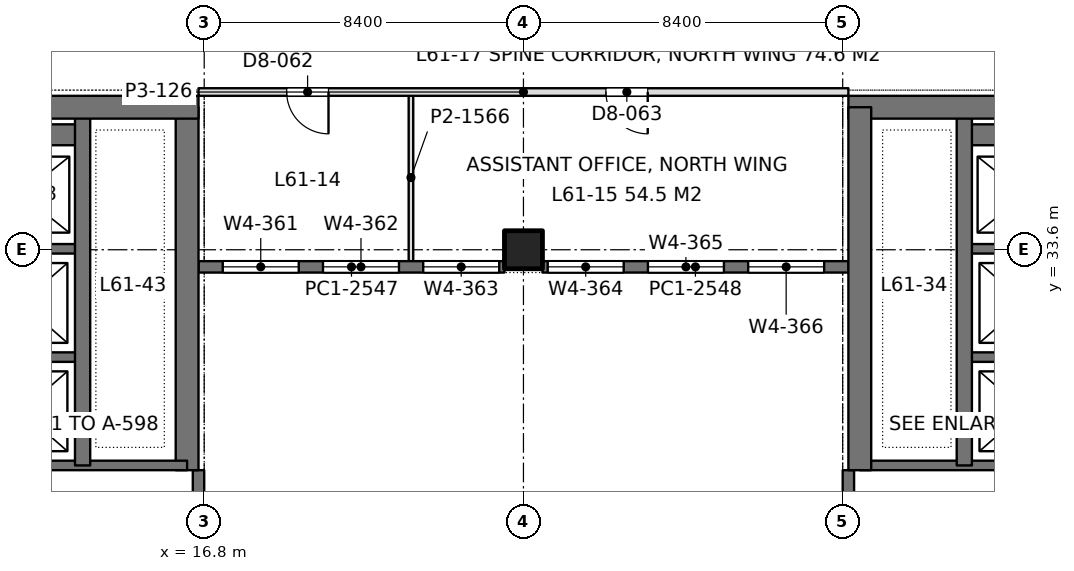
"""IFC4 building model, lengths in metres.
Left out: names, types, materials, properties, quantities, classifications, styles, units other than length and angle.
Written with IfcOpenShell. Run it as: python <this file> out.ifc"""

import sys

from ifc_helpers import new_model, si_unit, direction, frame, frame_2d, origin, origin_2d, place, context, subcontext, project, spatial, rectangle, extrude, element, fill, save


model = new_model("IFC4")
c1 = context("Model", 3, precision=1e-05, world=origin(), true_north=direction((0.0, 1.0)))
c2 = subcontext(c1, "Body", "Model", "MODEL_VIEW")
j1 = project(units=[si_unit("LENGTHUNIT", "METRE"), si_unit("PLANEANGLEUNIT", "RADIAN")], contexts=[c1])
p1 = place(None, origin())
s1 = spatial("IfcSite", under=j1, at=p1, CompositionType="ELEMENT")
p2 = place(p1, origin())
s2 = spatial("IfcBuilding", under=s1, at=p2, CompositionType="ELEMENT")
p3 = place(p2, frame((0.0, 0.0, 268.2)))
s3 = spatial("IfcBuildingStorey", under=s2, at=p3, CompositionType="ELEMENT", Elevation=268.2)
p4 = place(p3, frame((25.2, 33.6, 0.0), z_axis=(0.0, 0.0, 1.0), x_axis=(1.0, 0.0, 0.0)))
e1 = element("IfcColumn", 1, at=p4, inside=s3, PredefinedType="COLUMN", context=c2, shape_type="SweptSolid", body=[
    extrude(rectangle(XDim=1.0, YDim=1.0, at=origin_2d()), origin(), (0.0, 0.0, 1.0), 4.5),
])
p5 = place(p3, frame((-1.05, 37.35, 0.0), z_axis=(0.0, 0.0, 1.0), x_axis=(1.0, 0.0, 0.0)))
e2 = element("IfcWall", 2, at=p5, inside=s3, PredefinedType="SHEAR", context=c2, shape_type="SweptSolid", body=[
    extrude(rectangle(XDim=17.7, YDim=0.6, at=frame_2d((8.85, 0.0))), origin(), (0.0, 0.0, 1.0), 4.5),
])
p6 = place(p5, frame((8.8, 0.0, 0.0)))
e3 = element("IfcOpeningElement", 3, at=p6, cuts=e2, PredefinedType="OPENING", context=c2, shape_type="SweptSolid", body=[
    extrude(rectangle(XDim=1.8, YDim=2.4, at=frame_2d((0.9, 1.2))), frame((0.0, 0.31, 0.0), z_axis=(0.0, -1.0, 0.0), x_axis=(1.0, 0.0, 0.0)), (0.0, 0.0, 1.0), 0.62),
])
p7 = place(p3, frame((16.35, 27.8, 0.0), z_axis=(0.0, 0.0, 1.0), x_axis=(0.0, 1.0, 0.0)))
e4 = element("IfcWall", 4, at=p7, inside=s3, PredefinedType="SHEAR", context=c2, shape_type="SweptSolid", body=[
    extrude(rectangle(XDim=9.55, YDim=0.6, at=frame_2d((4.775, 0.0))), origin(), (0.0, 0.0, 1.0), 4.5),
])
p8 = place(p3, frame((13.6, 27.925, 0.0), z_axis=(0.0, 0.0, 1.0), x_axis=(0.0, 1.0, 0.0)))
e5 = element("IfcWall", 5, at=p8, inside=s3, PredefinedType="SHEAR", context=c2, shape_type="SweptSolid", body=[
    extrude(rectangle(XDim=9.425, YDim=0.4, at=frame_2d((4.712, 0.0))), origin(), (0.0, 0.0, 1.0), 4.5),
])
p9 = place(p3, frame((10.4, 27.925, 0.0), z_axis=(0.0, 0.0, 1.0), x_axis=(1.0, 0.0, 0.0)))
e6 = element("IfcWall", 6, at=p9, inside=s3, PredefinedType="SHEAR", context=c2, shape_type="SweptSolid", body=[
    extrude(rectangle(XDim=5.95, YDim=0.25, at=frame_2d((2.975, 0.0))), origin(), (0.0, 0.0, 1.0), 4.5),
])
for number, where, z_axis, x_axis in (
    (7, (10.4, 30.775, 0.0), (0.0, 0.0, 1.0), (1.0, 0.0, 0.0)),
    (8, (10.4, 33.625, 0.0), (0.0, 0.0, 1.0), (1.0, 0.0, 0.0)),
):
    element("IfcWall", number, at=place(p3, frame(where, z_axis=z_axis, x_axis=x_axis)), inside=s3, PredefinedType="SHEAR", context=c2, shape_type="SweptSolid", body=[
        extrude(rectangle(XDim=3.2, YDim=0.25, at=frame_2d((1.6, 0.0))), origin(), (0.0, 0.0, 1.0), 4.5),
    ])
p10 = place(p3, frame((10.4, 36.625, 0.0), z_axis=(0.0, 0.0, 1.0), x_axis=(1.0, 0.0, 0.0)))
e9 = element("IfcWall", 9, at=p10, inside=s3, PredefinedType="SHEAR", context=c2, shape_type="SweptSolid", body=[
    extrude(rectangle(XDim=3.2, YDim=0.55, at=frame_2d((1.6, 0.0))), origin(), (0.0, 0.0, 1.0), 4.5),
])
p11 = place(p3, frame((33.75, 37.35, 0.0), z_axis=(0.0, 0.0, 1.0), x_axis=(1.0, 0.0, 0.0)))
e10 = element("IfcWall", 10, at=p11, inside=s3, PredefinedType="SHEAR", context=c2, shape_type="SweptSolid", body=[
    extrude(rectangle(XDim=17.7, YDim=0.6, at=frame_2d((8.85, 0.0))), origin(), (0.0, 0.0, 1.0), 4.5),
])
p12 = place(p11, frame((7.1, 0.0, 0.0)))
e11 = element("IfcOpeningElement", 11, at=p12, cuts=e10, PredefinedType="OPENING", context=c2, shape_type="SweptSolid", body=[
    extrude(rectangle(XDim=1.8, YDim=2.4, at=frame_2d((0.9, 1.2))), frame((0.0, 0.31, 0.0), z_axis=(0.0, -1.0, 0.0), x_axis=(1.0, 0.0, 0.0)), (0.0, 0.0, 1.0), 0.62),
])
p13 = place(p3, frame((34.05, 27.8, 0.0), z_axis=(0.0, 0.0, 1.0), x_axis=(0.0, 1.0, 0.0)))
e12 = element("IfcWall", 12, at=p13, inside=s3, PredefinedType="SHEAR", context=c2, shape_type="SweptSolid", body=[
    extrude(rectangle(XDim=9.55, YDim=0.6, at=frame_2d((4.775, 0.0))), origin(), (0.0, 0.0, 1.0), 4.5),
])
p14 = place(p3, frame((36.8, 27.925, 0.0), z_axis=(0.0, 0.0, 1.0), x_axis=(0.0, 1.0, 0.0)))
e13 = element("IfcWall", 13, at=p14, inside=s3, PredefinedType="SHEAR", context=c2, shape_type="SweptSolid", body=[
    extrude(rectangle(XDim=9.425, YDim=0.4, at=frame_2d((4.712, 0.0))), origin(), (0.0, 0.0, 1.0), 4.5),
])
p15 = place(p3, frame((40.0, 27.925, 0.0), z_axis=(0.0, 0.0, 1.0), x_axis=(-1.0, 0.0, 0.0)))
e14 = element("IfcWall", 14, at=p15, inside=s3, PredefinedType="SHEAR", context=c2, shape_type="SweptSolid", body=[
    extrude(rectangle(XDim=5.95, YDim=0.25, at=frame_2d((2.975, 0.0))), origin(), (0.0, 0.0, 1.0), 4.5),
])
for number, where, z_axis, x_axis in (
    (15, (40.0, 30.775, 0.0), (0.0, 0.0, 1.0), (-1.0, 0.0, 0.0)),
    (16, (40.0, 33.625, 0.0), (0.0, 0.0, 1.0), (-1.0, 0.0, 0.0)),
):
    element("IfcWall", number, at=place(p3, frame(where, z_axis=z_axis, x_axis=x_axis)), inside=s3, PredefinedType="SHEAR", context=c2, shape_type="SweptSolid", body=[
        extrude(rectangle(XDim=3.2, YDim=0.25, at=frame_2d((1.6, 0.0))), origin(), (0.0, 0.0, 1.0), 4.5),
    ])
p16 = place(p3, frame((40.0, 36.625, 0.0), z_axis=(0.0, 0.0, 1.0), x_axis=(-1.0, 0.0, 0.0)))
e17 = element("IfcWall", 17, at=p16, inside=s3, PredefinedType="SHEAR", context=c2, shape_type="SweptSolid", body=[
    extrude(rectangle(XDim=3.2, YDim=0.55, at=frame_2d((1.6, 0.0))), origin(), (0.0, 0.0, 1.0), 4.5),
])
p17 = place(p3, frame((16.65, 17.1, 0.0), z_axis=(0.0, 0.0, 1.0), x_axis=(0.0, 1.0, 0.0)))
e18 = element("IfcWall", 18, at=p17, inside=s3, PredefinedType="SOLIDWALL", context=c2, shape_type="SweptSolid", body=[
    extrude(rectangle(XDim=10.7, YDim=0.3, at=frame_2d((5.35, 0.0))), origin(), (0.0, 0.0, 1.0), 4.35),
])
p18 = place(p17, frame((0.55, 0.0, 0.9)))
e19 = element("IfcOpeningElement", 19, at=p18, cuts=e18, PredefinedType="OPENING", context=c2, shape_type="SweptSolid", body=[
    extrude(rectangle(XDim=2.0, YDim=1.9, at=frame_2d((1.0, 0.95))), frame((0.0, 0.16, 0.0), z_axis=(0.0, -1.0, 0.0), x_axis=(1.0, 0.0, 0.0)), (0.0, 0.0, 1.0), 0.32),
])
p19 = place(p17, frame((2.9, 0.0, 0.9)))
e20 = element("IfcOpeningElement", 20, at=p19, cuts=e18, PredefinedType="OPENING", context=c2, shape_type="SweptSolid", body=[
    extrude(rectangle(XDim=2.0, YDim=1.9, at=frame_2d((1.0, 0.95))), frame((0.0, 0.16, 0.0), z_axis=(0.0, -1.0, 0.0), x_axis=(1.0, 0.0, 0.0)), (0.0, 0.0, 1.0), 0.32),
])
p20 = place(p17, frame((7.675, 0.0, 0.9)))
e21 = element("IfcOpeningElement", 21, at=p20, cuts=e18, PredefinedType="OPENING", context=c2, shape_type="SweptSolid", body=[
    extrude(rectangle(XDim=2.0, YDim=1.9, at=frame_2d((1.0, 0.95))), frame((0.0, 0.16, 0.0), z_axis=(0.0, -1.0, 0.0), x_axis=(1.0, 0.0, 0.0)), (0.0, 0.0, 1.0), 0.32),
])
p21 = place(p3, frame((33.75, 17.1, 0.0), z_axis=(0.0, 0.0, 1.0), x_axis=(0.0, 1.0, 0.0)))
e22 = element("IfcWall", 22, at=p21, inside=s3, PredefinedType="SOLIDWALL", context=c2, shape_type="SweptSolid", body=[
    extrude(rectangle(XDim=10.7, YDim=0.3, at=frame_2d((5.35, 0.0))), origin(), (0.0, 0.0, 1.0), 4.35),
])
p22 = place(p21, frame((0.55, 0.0, 0.9)))
e23 = element("IfcOpeningElement", 23, at=p22, cuts=e22, PredefinedType="OPENING", context=c2, shape_type="SweptSolid", body=[
    extrude(rectangle(XDim=2.0, YDim=1.9, at=frame_2d((1.0, 0.95))), frame((0.0, 0.16, 0.0), z_axis=(0.0, -1.0, 0.0), x_axis=(1.0, 0.0, 0.0)), (0.0, 0.0, 1.0), 0.32),
])
p23 = place(p21, frame((2.9, 0.0, 0.9)))
e24 = element("IfcOpeningElement", 24, at=p23, cuts=e22, PredefinedType="OPENING", context=c2, shape_type="SweptSolid", body=[
    extrude(rectangle(XDim=2.0, YDim=1.9, at=frame_2d((1.0, 0.95))), frame((0.0, 0.16, 0.0), z_axis=(0.0, -1.0, 0.0), x_axis=(1.0, 0.0, 0.0)), (0.0, 0.0, 1.0), 0.32),
])
p24 = place(p21, frame((7.675, 0.0, 0.9)))
e25 = element("IfcOpeningElement", 25, at=p24, cuts=e22, PredefinedType="OPENING", context=c2, shape_type="SweptSolid", body=[
    extrude(rectangle(XDim=2.0, YDim=1.9, at=frame_2d((1.0, 0.95))), frame((0.0, 0.16, 0.0), z_axis=(0.0, -1.0, 0.0), x_axis=(1.0, 0.0, 0.0)), (0.0, 0.0, 1.0), 0.32),
])
p25 = place(p3, frame((16.65, 33.15, 0.0), z_axis=(0.0, 0.0, 1.0), x_axis=(1.0, 0.0, 0.0)))
e26 = element("IfcWall", 26, at=p25, inside=s3, PredefinedType="SOLIDWALL", context=c2, shape_type="SweptSolid", body=[
    extrude(rectangle(XDim=8.05, YDim=0.3, at=frame_2d((4.025, 0.0))), origin(), (0.0, 0.0, 1.0), 4.35),
])
p26 = place(p25, frame((0.637, 0.0, 0.9)))
e27 = element("IfcOpeningElement", 27, at=p26, cuts=e26, PredefinedType="OPENING", context=c2, shape_type="SweptSolid", body=[
    extrude(rectangle(XDim=2.0, YDim=1.9, at=frame_2d((1.0, 0.95))), frame((0.0, 0.16, 0.0), z_axis=(0.0, -1.0, 0.0), x_axis=(1.0, 0.0, 0.0)), (0.0, 0.0, 1.0), 0.32),
])
p27 = place(p25, frame((3.275, 0.0, 0.9)))
e28 = element("IfcOpeningElement", 28, at=p27, cuts=e26, PredefinedType="OPENING", context=c2, shape_type="SweptSolid", body=[
    extrude(rectangle(XDim=2.0, YDim=1.9, at=frame_2d((1.0, 0.95))), frame((0.0, 0.16, 0.0), z_axis=(0.0, -1.0, 0.0), x_axis=(1.0, 0.0, 0.0)), (0.0, 0.0, 1.0), 0.32),
])
p28 = place(p25, frame((5.913, 0.0, 0.9)))
e29 = element("IfcOpeningElement", 29, at=p28, cuts=e26, PredefinedType="OPENING", context=c2, shape_type="SweptSolid", body=[
    extrude(rectangle(XDim=2.0, YDim=1.9, at=frame_2d((1.0, 0.95))), frame((0.0, 0.16, 0.0), z_axis=(0.0, -1.0, 0.0), x_axis=(1.0, 0.0, 0.0)), (0.0, 0.0, 1.0), 0.32),
])
p29 = place(p3, frame((25.7, 33.15, 0.0), z_axis=(0.0, 0.0, 1.0), x_axis=(1.0, 0.0, 0.0)))
e30 = element("IfcWall", 30, at=p29, inside=s3, PredefinedType="SOLIDWALL", context=c2, shape_type="SweptSolid", body=[
    extrude(rectangle(XDim=8.05, YDim=0.3, at=frame_2d((4.025, 0.0))), origin(), (0.0, 0.0, 1.0), 4.35),
])
p30 = place(p29, frame((0.137, 0.0, 0.9)))
e31 = element("IfcOpeningElement", 31, at=p30, cuts=e30, PredefinedType="OPENING", context=c2, shape_type="SweptSolid", body=[
    extrude(rectangle(XDim=2.0, YDim=1.9, at=frame_2d((1.0, 0.95))), frame((0.0, 0.16, 0.0), z_axis=(0.0, -1.0, 0.0), x_axis=(1.0, 0.0, 0.0)), (0.0, 0.0, 1.0), 0.32),
])
p31 = place(p29, frame((2.775, 0.0, 0.9)))
e32 = element("IfcOpeningElement", 32, at=p31, cuts=e30, PredefinedType="OPENING", context=c2, shape_type="SweptSolid", body=[
    extrude(rectangle(XDim=2.0, YDim=1.9, at=frame_2d((1.0, 0.95))), frame((0.0, 0.16, 0.0), z_axis=(0.0, -1.0, 0.0), x_axis=(1.0, 0.0, 0.0)), (0.0, 0.0, 1.0), 0.32),
])
p32 = place(p29, frame((5.413, 0.0, 0.9)))
e33 = element("IfcOpeningElement", 33, at=p32, cuts=e30, PredefinedType="OPENING", context=c2, shape_type="SweptSolid", body=[
    extrude(rectangle(XDim=2.0, YDim=1.9, at=frame_2d((1.0, 0.95))), frame((0.0, 0.16, 0.0), z_axis=(0.0, -1.0, 0.0), x_axis=(1.0, 0.0, 0.0)), (0.0, 0.0, 1.0), 0.32),
])
p33 = place(p3, frame((22.24, 33.298, 0.0), z_axis=(0.0, 0.0, 1.0), x_axis=(0.0, 1.0, 0.0)))
e34 = element("IfcWall", 34, at=p33, inside=s3, PredefinedType="PARTITIONING", context=c2, shape_type="SweptSolid", body=[
    extrude(rectangle(XDim=4.404, YDim=0.12, at=frame_2d((2.202, 0.0))), origin(), (0.0, 0.0, 1.0), 3.66),
])
p34 = place(p3, frame((16.65, 37.75, 0.0), z_axis=(0.0, 0.0, 1.0), x_axis=(1.0, 0.0, 0.0)))
e35 = element("IfcWall", 35, at=p34, inside=s3, PredefinedType="PARTITIONING", context=c2, shape_type="SweptSolid", body=[
    extrude(rectangle(XDim=17.1, YDim=0.2, at=frame_2d((8.55, 0.0))), origin(), (0.0, 0.0, 1.0), 3.8),
])
p35 = place(p34, frame((2.32, 0.0, 0.0)))
e36 = element("IfcOpeningElement", 36, at=p35, cuts=e35, PredefinedType="OPENING", context=c2, shape_type="SweptSolid", body=[
    extrude(rectangle(XDim=1.1, YDim=2.4, at=frame_2d((0.55, 1.2))), frame((0.0, 0.11, 0.0), z_axis=(0.0, -1.0, 0.0), x_axis=(1.0, 0.0, 0.0)), (0.0, 0.0, 1.0), 0.22),
])
p36 = place(p34, frame((10.72, 0.0, 0.0)))
e37 = element("IfcOpeningElement", 37, at=p36, cuts=e35, PredefinedType="OPENING", context=c2, shape_type="SweptSolid", body=[
    extrude(rectangle(XDim=1.1, YDim=2.4, at=frame_2d((0.55, 1.2))), frame((0.0, 0.11, 0.0), z_axis=(0.0, -1.0, 0.0), x_axis=(1.0, 0.0, 0.0)), (0.0, 0.0, 1.0), 0.22),
])
p37 = place(p26, origin())
e38 = element("IfcWindow", 38, at=p37, inside=s3, PartitioningType="SINGLE_PANEL", PredefinedType="WINDOW", context=c2, shape_type="SweptSolid", body=[
    extrude(rectangle(XDim=2.0, YDim=1.9, at=frame_2d((1.0, 0.95))), frame((0.0, 0.03, 0.0), z_axis=(0.0, -1.0, 0.0), x_axis=(1.0, 0.0, 0.0)), (0.0, 0.0, 1.0), 0.06),
])
fill(e27, e38)
p38 = place(p27, origin())
e39 = element("IfcWindow", 39, at=p38, inside=s3, PartitioningType="SINGLE_PANEL", PredefinedType="WINDOW", context=c2, shape_type="SweptSolid", body=[
    extrude(rectangle(XDim=2.0, YDim=1.9, at=frame_2d((1.0, 0.95))), frame((0.0, 0.03, 0.0), z_axis=(0.0, -1.0, 0.0), x_axis=(1.0, 0.0, 0.0)), (0.0, 0.0, 1.0), 0.06),
])
fill(e28, e39)
p39 = place(p28, origin())
e40 = element("IfcWindow", 40, at=p39, inside=s3, PartitioningType="SINGLE_PANEL", PredefinedType="WINDOW", context=c2, shape_type="SweptSolid", body=[
    extrude(rectangle(XDim=2.0, YDim=1.9, at=frame_2d((1.0, 0.95))), frame((0.0, 0.03, 0.0), z_axis=(0.0, -1.0, 0.0), x_axis=(1.0, 0.0, 0.0)), (0.0, 0.0, 1.0), 0.06),
])
fill(e29, e40)
p40 = place(p30, origin())
e41 = element("IfcWindow", 41, at=p40, inside=s3, PartitioningType="SINGLE_PANEL", PredefinedType="WINDOW", context=c2, shape_type="SweptSolid", body=[
    extrude(rectangle(XDim=2.0, YDim=1.9, at=frame_2d((1.0, 0.95))), frame((0.0, 0.03, 0.0), z_axis=(0.0, -1.0, 0.0), x_axis=(1.0, 0.0, 0.0)), (0.0, 0.0, 1.0), 0.06),
])
fill(e31, e41)
p41 = place(p31, origin())
e42 = element("IfcWindow", 42, at=p41, inside=s3, PartitioningType="SINGLE_PANEL", PredefinedType="WINDOW", context=c2, shape_type="SweptSolid", body=[
    extrude(rectangle(XDim=2.0, YDim=1.9, at=frame_2d((1.0, 0.95))), frame((0.0, 0.03, 0.0), z_axis=(0.0, -1.0, 0.0), x_axis=(1.0, 0.0, 0.0)), (0.0, 0.0, 1.0), 0.06),
])
fill(e32, e42)
p42 = place(p32, origin())
e43 = element("IfcWindow", 43, at=p42, inside=s3, PartitioningType="SINGLE_PANEL", PredefinedType="WINDOW", context=c2, shape_type="SweptSolid", body=[
    extrude(rectangle(XDim=2.0, YDim=1.9, at=frame_2d((1.0, 0.95))), frame((0.0, 0.03, 0.0), z_axis=(0.0, -1.0, 0.0), x_axis=(1.0, 0.0, 0.0)), (0.0, 0.0, 1.0), 0.06),
])
fill(e33, e43)
p43 = place(p35, frame((1.1, 0.0, 0.0), z_axis=(0.0, 0.0, 1.0), x_axis=(-1.0, 0.0, 0.0)))
e44 = element("IfcDoor", 44, at=p43, inside=s3, OperationType="SINGLE_SWING_LEFT", PredefinedType="DOOR", context=c2, shape_type="SweptSolid", body=[
    extrude(rectangle(XDim=1.1, YDim=2.4, at=frame_2d((0.55, 1.2))), frame((0.0, 0.025, 0.0), z_axis=(0.0, -1.0, 0.0), x_axis=(1.0, 0.0, 0.0)), (0.0, 0.0, 1.0), 0.05),
])
fill(e36, e44)
p44 = place(p36, frame((1.1, 0.0, 0.0), z_axis=(0.0, 0.0, 1.0), x_axis=(-1.0, 0.0, 0.0)))
e45 = element("IfcDoor", 45, at=p44, inside=s3, OperationType="SINGLE_SWING_LEFT", PredefinedType="DOOR", context=c2, shape_type="SweptSolid", body=[
    extrude(rectangle(XDim=1.1, YDim=2.4, at=frame_2d((0.55, 1.2))), frame((0.0, 0.025, 0.0), z_axis=(0.0, -1.0, 0.0), x_axis=(1.0, 0.0, 0.0)), (0.0, 0.0, 1.0), 0.05),
])
fill(e37, e45)
save(model, sys.argv[1])
